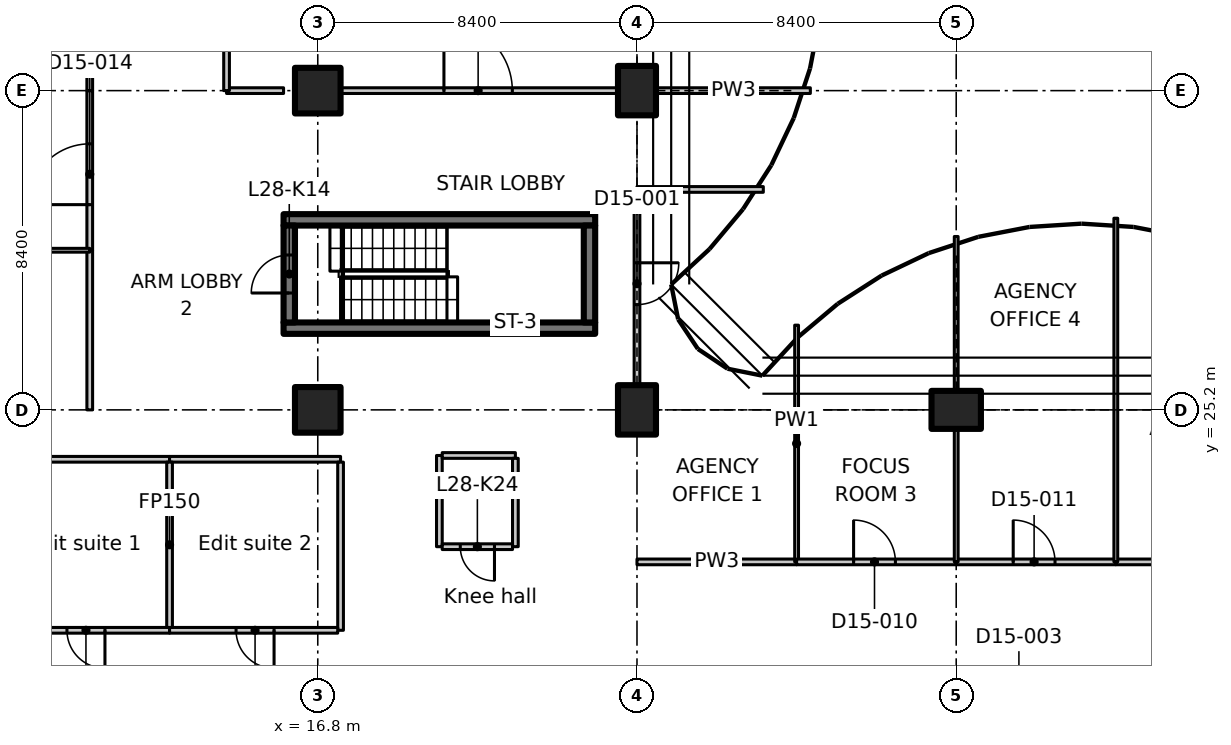
"""IFC4 building model, lengths in metres.
Left out: names, types, materials, properties, quantities, classifications, styles, units other than length and angle.
Written with IfcOpenShell. Run it as: python <this file> out.ifc"""

import sys

from ifc_helpers import new_model, si_unit, direction, frame, frame_2d, origin, origin_2d, place, context, subcontext, project, spatial, polyline, rectangle, outline, extrude, element, fill, save


model = new_model("IFC4")
c1 = context("Model", 3, precision=1e-05, world=origin(), true_north=direction((0.0, 1.0)))
c2 = subcontext(c1, "Body", "Model", "MODEL_VIEW")
j1 = project(units=[si_unit("LENGTHUNIT", "METRE"), si_unit("PLANEANGLEUNIT", "RADIAN")], contexts=[c1])
p1 = place(None, origin())
s1 = spatial("IfcSite", under=j1, at=p1, CompositionType="ELEMENT")
p2 = place(p1, origin())
s2 = spatial("IfcBuilding", under=s1, at=p2, CompositionType="ELEMENT")
p3 = place(p2, frame((0.0, 0.0, 116.9)))
s3 = spatial("IfcBuildingStorey", under=s2, at=p3, CompositionType="ELEMENT", Elevation=116.9)
for number, where, z_axis, x_axis in (
    (1, (16.8, 25.2, 0.0), (0.0, 0.0, 1.0), (1.0, 0.0, 0.0)),
    (2, (16.8, 33.6, 0.0), (0.0, 0.0, 1.0), (1.0, 0.0, 0.0)),
):
    element("IfcColumn", number, at=place(p3, frame(where, z_axis=z_axis, x_axis=x_axis)), inside=s3, PredefinedType="COLUMN", context=c2, shape_type="SweptSolid", body=[
        extrude(rectangle(XDim=1.2, YDim=1.2, at=origin_2d()), origin(), (0.0, 0.0, 1.0), 3.35),
    ])
for number, where, z_axis, x_axis in (
    (3, (25.2, 25.2, 0.0), (0.0, 0.0, 1.0), (1.0, 0.0, 0.0)),
    (4, (25.2, 33.6, 0.0), (0.0, 0.0, 1.0), (1.0, 0.0, 0.0)),
    (5, (33.6, 25.2, 0.0), (0.0, 0.0, 1.0), (0.0, 1.0, 0.0)),
):
    element("IfcColumn", number, at=place(p3, frame(where, z_axis=z_axis, x_axis=x_axis)), inside=s3, PredefinedType="COLUMN", context=c2, shape_type="SweptSolid", body=[
        extrude(rectangle(XDim=1.0, YDim=1.3, at=origin_2d()), origin(), (0.0, 0.0, 1.0), 3.35),
    ])
for number, where, z_axis, x_axis in (
    (6, (15.9, 27.35, 0.0), (0.0, 0.0, 1.0), (1.0, 0.0, 0.0)),
    (7, (15.9, 30.2, 0.0), (0.0, 0.0, 1.0), (1.0, 0.0, 0.0)),
):
    element("IfcWall", number, at=place(p3, frame(where, z_axis=z_axis, x_axis=x_axis)), inside=s3, PredefinedType="SHEAR", context=c2, shape_type="SweptSolid", body=[
        extrude(rectangle(XDim=8.2, YDim=0.3, at=frame_2d((4.1, 0.0))), origin(), (0.0, 0.0, 1.0), 3.35),
    ])
p4 = place(p3, frame((16.05, 27.5, 0.0), z_axis=(0.0, 0.0, 1.0), x_axis=(0.0, 1.0, 0.0)))
e8 = element("IfcWall", 8, at=p4, inside=s3, PredefinedType="SHEAR", context=c2, shape_type="SweptSolid", body=[
    extrude(rectangle(XDim=2.55, YDim=0.3, at=frame_2d((1.275, 0.0))), origin(), (0.0, 0.0, 1.0), 3.35),
])
p5 = place(p4, frame((0.775, 0.0, 0.0)))
e9 = element("IfcOpeningElement", 9, at=p5, cuts=e8, PredefinedType="OPENING", context=c2, shape_type="SweptSolid", body=[
    extrude(rectangle(XDim=1.0, YDim=2.1, at=frame_2d((0.5, 1.05))), frame((0.0, 0.16, 0.0), z_axis=(0.0, -1.0, 0.0), x_axis=(1.0, 0.0, 0.0)), (0.0, 0.0, 1.0), 0.32),
])
p6 = place(p3, frame((23.95, 27.5, 0.0), z_axis=(0.0, 0.0, 1.0), x_axis=(0.0, 1.0, 0.0)))
e10 = element("IfcWall", 10, at=p6, inside=s3, PredefinedType="SHEAR", context=c2, shape_type="SweptSolid", body=[
    extrude(rectangle(XDim=2.55, YDim=0.3, at=frame_2d((1.275, 0.0))), origin(), (0.0, 0.0, 1.0), 3.35),
])
p7 = place(p3, frame((12.9, 19.4, 0.0), z_axis=(0.0, 0.0, 1.0), x_axis=(-1.0, 0.0, 0.0)))
e11 = element("IfcWall", 11, at=p7, inside=s3, PredefinedType="PARTITIONING", context=c2, shape_type="SweptSolid", body=[
    extrude(rectangle(XDim=4.4, YDim=0.15, at=frame_2d((2.2, 0.0))), origin(), (0.0, 0.0, 1.0), 3.35),
])
p8 = place(p7, frame((1.7, 0.0, 0.0)))
e12 = element("IfcOpeningElement", 12, at=p8, cuts=e11, PredefinedType="OPENING", context=c2, shape_type="SweptSolid", body=[
    extrude(rectangle(XDim=1.0, YDim=2.1, at=frame_2d((0.5, 1.05))), frame((0.0, 0.085, 0.0), z_axis=(0.0, -1.0, 0.0), x_axis=(1.0, 0.0, 0.0)), (0.0, 0.0, 1.0), 0.17),
])
p9 = place(p3, frame((8.575, 23.9, 0.0), z_axis=(0.0, 0.0, 1.0), x_axis=(1.0, 0.0, 0.0)))
e13 = element("IfcWall", 13, at=p9, inside=s3, PredefinedType="PARTITIONING", context=c2, shape_type="SweptSolid", body=[
    extrude(rectangle(XDim=4.325, YDim=0.15, at=frame_2d((2.163, 0.0))), origin(), (0.0, 0.0, 1.0), 3.35),
])
p10 = place(p3, frame((12.9, 23.9, 0.0), z_axis=(0.0, 0.0, 1.0), x_axis=(1.0, 0.0, 0.0)))
e14 = element("IfcWall", 14, at=p10, inside=s3, PredefinedType="PARTITIONING", context=c2, shape_type="SweptSolid", body=[
    extrude(rectangle(XDim=4.5, YDim=0.15, at=frame_2d((2.25, 0.0))), origin(), (0.0, 0.0, 1.0), 3.35),
])
p11 = place(p3, frame((17.4, 23.825, 0.0), z_axis=(0.0, 0.0, 1.0), x_axis=(0.0, -1.0, 0.0)))
e15 = element("IfcWall", 15, at=p11, inside=s3, PredefinedType="PARTITIONING", context=c2, shape_type="SweptSolid", body=[
    extrude(rectangle(XDim=4.425, YDim=0.15, at=frame_2d((2.212, 0.0))), origin(), (0.0, 0.0, 1.0), 3.35),
])
p12 = place(p3, frame((17.325, 19.4, 0.0), z_axis=(0.0, 0.0, 1.0), x_axis=(-1.0, 0.0, 0.0)))
e16 = element("IfcWall", 16, at=p12, inside=s3, PredefinedType="PARTITIONING", context=c2, shape_type="SweptSolid", body=[
    extrude(rectangle(XDim=4.425, YDim=0.15, at=frame_2d((2.212, 0.0))), origin(), (0.0, 0.0, 1.0), 3.35),
])
p13 = place(p12, frame((1.675, 0.0, 0.0)))
e17 = element("IfcOpeningElement", 17, at=p13, cuts=e16, PredefinedType="OPENING", context=c2, shape_type="SweptSolid", body=[
    extrude(rectangle(XDim=1.0, YDim=2.1, at=frame_2d((0.5, 1.05))), frame((0.0, 0.085, 0.0), z_axis=(0.0, -1.0, 0.0), x_axis=(1.0, 0.0, 0.0)), (0.0, 0.0, 1.0), 0.17),
])
p14 = place(p3, frame((12.9, 23.825, 0.0), z_axis=(0.0, 0.0, 1.0), x_axis=(0.0, -1.0, 0.0)))
e18 = element("IfcWall", 18, at=p14, inside=s3, PredefinedType="PARTITIONING", context=c2, shape_type="SweptSolid", body=[
    extrude(rectangle(XDim=4.35, YDim=0.15, at=frame_2d((2.175, 0.0))), origin(), (0.0, 0.0, 1.0), 3.35),
])
p15 = place(p3, frame((20.0, 21.6, 0.0), z_axis=(0.0, 0.0, 1.0), x_axis=(0.0, 1.0, 0.0)))
e19 = element("IfcWall", 19, at=p15, inside=s3, PredefinedType="PARTITIONING", context=c2, shape_type="SweptSolid", body=[
    extrude(rectangle(XDim=2.4, YDim=0.15, at=frame_2d((1.2, 0.0))), origin(), (0.0, 0.0, 1.0), 3.35),
])
p16 = place(p3, frame((20.075, 24.0, 0.0), z_axis=(0.0, 0.0, 1.0), x_axis=(1.0, 0.0, 0.0)))
e20 = element("IfcWall", 20, at=p16, inside=s3, PredefinedType="PARTITIONING", context=c2, shape_type="SweptSolid", body=[
    extrude(rectangle(XDim=1.925, YDim=0.15, at=frame_2d((0.962, 0.0))), origin(), (0.0, 0.0, 1.0), 3.35),
])
p17 = place(p3, frame((22.0, 23.925, 0.0), z_axis=(0.0, 0.0, 1.0), x_axis=(0.0, -1.0, 0.0)))
e21 = element("IfcWall", 21, at=p17, inside=s3, PredefinedType="PARTITIONING", context=c2, shape_type="SweptSolid", body=[
    extrude(rectangle(XDim=2.325, YDim=0.15, at=frame_2d((1.163, 0.0))), origin(), (0.0, 0.0, 1.0), 3.35),
])
p18 = place(p3, frame((21.925, 21.6, 0.0), z_axis=(0.0, 0.0, 1.0), x_axis=(-1.0, 0.0, 0.0)))
e22 = element("IfcWall", 22, at=p18, inside=s3, PredefinedType="PARTITIONING", context=c2, shape_type="SweptSolid", body=[
    extrude(rectangle(XDim=1.85, YDim=0.15, at=frame_2d((0.925, 0.0))), origin(), (0.0, 0.0, 1.0), 3.35),
])
p19 = place(p18, frame((0.475, 0.0, 0.0)))
e23 = element("IfcOpeningElement", 23, at=p19, cuts=e22, PredefinedType="OPENING", context=c2, shape_type="SweptSolid", body=[
    extrude(rectangle(XDim=0.9, YDim=2.1, at=frame_2d((0.45, 1.05))), frame((0.0, 0.085, 0.0), z_axis=(0.0, -1.0, 0.0), x_axis=(1.0, 0.0, 0.0)), (0.0, 0.0, 1.0), 0.17),
])
p20 = place(p3, frame((25.2, 21.2, 0.0), z_axis=(0.0, 0.0, 1.0), x_axis=(1.0, 0.0, 0.0)))
e24 = element("IfcWall", 24, at=p20, inside=s3, PredefinedType="PARTITIONING", context=c2, shape_type="SweptSolid", body=[
    extrude(rectangle(XDim=4.2, YDim=0.15, at=frame_2d((2.1, 0.0))), origin(), (0.0, 0.0, 1.0), 3.33),
])
p21 = place(p3, frame((29.4, 27.429, 0.0), z_axis=(0.0, 0.0, 1.0), x_axis=(0.0, -1.0, 0.0)))
e25 = element("IfcWall", 25, at=p21, inside=s3, PredefinedType="PARTITIONING", context=c2, shape_type="SweptSolid", body=[
    extrude(outline(polyline([(0.0, 0.0), (6.229, 0.0), (6.229, 3.33), (2.679, 3.33), (2.677, 2.98), (1.781, 2.98), (1.779, 3.33), (0.154, 3.33), (0.0, 3.33), (0.0, 0.0)])), frame((0.0, 0.05, 0.0), z_axis=(0.0, -1.0, 0.0), x_axis=(1.0, 0.0, 0.0)), (0.0, 0.0, 1.0), 0.1),
])
p22 = place(p3, frame((25.2, 31.0, 0.0), z_axis=(0.0, 0.0, 1.0), x_axis=(0.0, -1.0, 0.0)))
e26 = element("IfcWall", 26, at=p22, inside=s3, PredefinedType="PARTITIONING", context=c2, shape_type="SweptSolid", body=[
    extrude(outline(polyline([(0.0, 0.0), (5.13, 0.0), (5.13, 2.98), (0.0, 2.98), (0.0, 0.0)])), frame((0.0, 0.075, 0.0), z_axis=(0.0, -1.0, 0.0), x_axis=(1.0, 0.0, 0.0)), (0.0, 0.0, 1.0), 0.15),
])
p23 = place(p22, frame((1.93, 0.0, 0.0)))
e27 = element("IfcOpeningElement", 27, at=p23, cuts=e26, PredefinedType="OPENING", context=c2, shape_type="SweptSolid", body=[
    extrude(rectangle(XDim=1.1, YDim=2.1, at=frame_2d((0.55, 1.05))), frame((0.0, 0.085, 0.0), z_axis=(0.0, -1.0, 0.0), x_axis=(1.0, 0.0, 0.0)), (0.0, 0.0, 1.0), 0.17),
])
p24 = place(p3, frame((25.2, 31.0, 0.0), z_axis=(0.0, 0.0, 1.0), x_axis=(1.0, 0.0, 0.0)))
e28 = element("IfcWall", 28, at=p24, inside=s3, PredefinedType="PARTITIONING", context=c2, shape_type="SweptSolid", body=[
    extrude(rectangle(XDim=3.324, YDim=0.15, at=frame_2d((1.662, 0.0))), origin(), (0.0, 0.0, 1.0), 2.98),
])
p25 = place(p3, frame((29.4, 21.2, 0.0), z_axis=(0.0, 0.0, 1.0), x_axis=(1.0, 0.0, 0.0)))
e29 = element("IfcWall", 29, at=p25, inside=s3, PredefinedType="PARTITIONING", context=c2, shape_type="SweptSolid", body=[
    extrude(rectangle(XDim=4.2, YDim=0.15, at=frame_2d((2.1, 0.0))), origin(), (0.0, 0.0, 1.0), 3.33),
])
p26 = place(p25, frame((1.5, 0.0, 0.0)))
e30 = element("IfcOpeningElement", 30, at=p26, cuts=e29, PredefinedType="OPENING", context=c2, shape_type="SweptSolid", body=[
    extrude(rectangle(XDim=1.1, YDim=2.1, at=frame_2d((0.55, 1.05))), frame((0.0, 0.085, 0.0), z_axis=(0.0, -1.0, 0.0), x_axis=(1.0, 0.0, 0.0)), (0.0, 0.0, 1.0), 0.17),
])
p27 = place(p3, frame((33.6, 21.2, 0.0), z_axis=(0.0, 0.0, 1.0), x_axis=(1.0, 0.0, 0.0)))
e31 = element("IfcWall", 31, at=p27, inside=s3, PredefinedType="PARTITIONING", context=c2, shape_type="SweptSolid", body=[
    extrude(rectangle(XDim=4.2, YDim=0.15, at=frame_2d((2.1, 0.0))), origin(), (0.0, 0.0, 1.0), 3.33),
])
p28 = place(p27, frame((1.5, 0.0, 0.0)))
e32 = element("IfcOpeningElement", 32, at=p28, cuts=e31, PredefinedType="OPENING", context=c2, shape_type="SweptSolid", body=[
    extrude(rectangle(XDim=1.1, YDim=2.1, at=frame_2d((0.55, 1.05))), frame((0.0, 0.085, 0.0), z_axis=(0.0, -1.0, 0.0), x_axis=(1.0, 0.0, 0.0)), (0.0, 0.0, 1.0), 0.17),
])
p29 = place(p3, frame((37.8, 21.2, 0.0), z_axis=(0.0, 0.0, 1.0), x_axis=(1.0, 0.0, 0.0)))
e33 = element("IfcWall", 33, at=p29, inside=s3, PredefinedType="PARTITIONING", context=c2, shape_type="SweptSolid", body=[
    extrude(rectangle(XDim=13.2, YDim=0.15, at=frame_2d((6.6, 0.0))), origin(), (0.0, 0.0, 1.0), 3.33),
])
p30 = place(p29, frame((5.7, 0.0, 0.0)))
e34 = element("IfcOpeningElement", 34, at=p30, cuts=e33, PredefinedType="OPENING", context=c2, shape_type="SweptSolid", body=[
    extrude(rectangle(XDim=2.0, YDim=2.4, at=frame_2d((1.0, 1.2))), frame((0.0, 0.085, 0.0), z_axis=(0.0, -1.0, 0.0), x_axis=(1.0, 0.0, 0.0)), (0.0, 0.0, 1.0), 0.17),
])
p31 = place(p3, frame((33.6, 29.762, 0.0), z_axis=(0.0, 0.0, 1.0), x_axis=(0.0, -1.0, 0.0)))
e35 = element("IfcWall", 35, at=p31, inside=s3, PredefinedType="PARTITIONING", context=c2, shape_type="SweptSolid", body=[
    extrude(rectangle(XDim=4.042, YDim=0.1, at=frame_2d((2.021, 0.0))), origin(), (0.0, 0.0, 1.0), 2.98),
])
p32 = place(p3, frame((33.6, 24.68, 0.0), z_axis=(0.0, 0.0, 1.0), x_axis=(0.0, -1.0, 0.0)))
e36 = element("IfcWall", 36, at=p32, inside=s3, PredefinedType="PARTITIONING", context=c2, shape_type="SweptSolid", body=[
    extrude(rectangle(XDim=3.48, YDim=0.1, at=frame_2d((1.74, 0.0))), origin(), (0.0, 0.0, 1.0), 3.33),
])
p33 = place(p3, frame((37.8, 30.243, 0.0), z_axis=(0.0, 0.0, 1.0), x_axis=(0.0, -1.0, 0.0)))
e37 = element("IfcWall", 37, at=p33, inside=s3, PredefinedType="PARTITIONING", context=c2, shape_type="SweptSolid", body=[
    extrude(outline(polyline([(0.0, 0.0), (9.043, 0.0), (9.043, 3.33), (5.493, 3.33), (5.491, 2.98), (4.595, 2.98), (4.593, 3.33), (0.0, 3.33), (0.0, 0.0)])), frame((0.0, 0.05, 0.0), z_axis=(0.0, -1.0, 0.0), x_axis=(1.0, 0.0, 0.0)), (0.0, 0.0, 1.0), 0.1),
])
p34 = place(p3, frame((10.8, 29.4, 0.0), z_axis=(0.0, 0.0, 1.0), x_axis=(0.0, 1.0, 0.0)))
e38 = element("IfcWall", 38, at=p34, inside=s3, PredefinedType="PARTITIONING", context=c2, shape_type="SweptSolid", body=[
    extrude(rectangle(XDim=4.2, YDim=0.15, at=frame_2d((2.1, 0.0))), origin(), (0.0, 0.0, 1.0), 3.33),
])
p35 = place(p34, frame((1.2, 0.0, 0.0)))
e39 = element("IfcOpeningElement", 39, at=p35, cuts=e38, PredefinedType="OPENING", context=c2, shape_type="SweptSolid", body=[
    extrude(rectangle(XDim=1.6, YDim=2.1, at=frame_2d((0.8, 1.05))), frame((0.0, 0.085, 0.0), z_axis=(0.0, -1.0, 0.0), x_axis=(1.0, 0.0, 0.0)), (0.0, 0.0, 1.0), 0.17),
])
p36 = place(p3, frame((10.8, 25.2, 0.0), z_axis=(0.0, 0.0, 1.0), x_axis=(0.0, 1.0, 0.0)))
e40 = element("IfcWall", 40, at=p36, inside=s3, PredefinedType="PARTITIONING", context=c2, shape_type="SweptSolid", body=[
    extrude(rectangle(XDim=4.2, YDim=0.15, at=frame_2d((2.1, 0.0))), origin(), (0.0, 0.0, 1.0), 3.33),
])
p37 = place(p3, frame((14.4, 33.6, 0.0), z_axis=(0.0, 0.0, 1.0), x_axis=(1.0, 0.0, 0.0)))
e41 = element("IfcWall", 41, at=p37, inside=s3, PredefinedType="PARTITIONING", context=c2, shape_type="SweptSolid", body=[
    extrude(rectangle(XDim=1.5, YDim=0.15, at=frame_2d((0.75, 0.0))), origin(), (0.0, 0.0, 1.0), 3.33),
])
p38 = place(p3, frame((17.42, 33.6, 0.0), z_axis=(0.0, 0.0, 1.0), x_axis=(1.0, 0.0, 0.0)))
e42 = element("IfcWall", 42, at=p38, inside=s3, PredefinedType="PARTITIONING", context=c2, shape_type="SweptSolid", body=[
    extrude(rectangle(XDim=7.26, YDim=0.15, at=frame_2d((3.63, 0.0))), origin(), (0.0, 0.0, 1.0), 3.33),
])
p39 = place(p38, frame((2.7, 0.0, 0.0)))
e43 = element("IfcOpeningElement", 43, at=p39, cuts=e42, PredefinedType="OPENING", context=c2, shape_type="SweptSolid", body=[
    extrude(rectangle(XDim=1.8, YDim=2.1, at=frame_2d((0.9, 1.05))), frame((0.0, 0.085, 0.0), z_axis=(0.0, -1.0, 0.0), x_axis=(1.0, 0.0, 0.0)), (0.0, 0.0, 1.0), 0.17),
])
p40 = place(p3, frame((25.72, 33.6, 0.0), z_axis=(0.0, 0.0, 1.0), x_axis=(1.0, 0.0, 0.0)))
e44 = element("IfcWall", 44, at=p40, inside=s3, PredefinedType="PARTITIONING", context=c2, shape_type="SweptSolid", body=[
    extrude(rectangle(XDim=4.042, YDim=0.15, at=frame_2d((2.021, 0.0))), origin(), (0.0, 0.0, 1.0), 2.98),
])
p41 = place(p3, frame((10.8, 33.6, 0.0), z_axis=(0.0, 0.0, 1.0), x_axis=(0.0, 1.0, 0.0)))
e45 = element("IfcWall", 45, at=p41, inside=s3, PredefinedType="PARTITIONING", context=c2, shape_type="SweptSolid", body=[
    extrude(rectangle(XDim=4.2, YDim=0.15, at=frame_2d((2.1, 0.0))), origin(), (0.0, 0.0, 1.0), 3.33),
])
p42 = place(p3, frame((14.4, 42.0, 0.0), z_axis=(0.0, 0.0, 1.0), x_axis=(0.0, -1.0, 0.0)))
e46 = element("IfcWall", 46, at=p42, inside=s3, PredefinedType="PARTITIONING", context=c2, shape_type="SweptSolid", body=[
    extrude(rectangle(XDim=8.4, YDim=0.15, at=frame_2d((4.2, 0.0))), origin(), (0.0, 0.0, 1.0), 3.33),
])
p43 = place(p3, frame((10.8, 29.4, 0.0), z_axis=(0.0, 0.0, 1.0), x_axis=(-1.0, 0.0, 0.0)))
e47 = element("IfcWall", 47, at=p43, inside=s3, PredefinedType="PARTITIONING", context=c2, shape_type="SweptSolid", body=[
    extrude(rectangle(XDim=7.2, YDim=0.1, at=frame_2d((3.6, 0.0))), origin(), (0.0, 0.0, 1.0), 3.33),
])
p44 = place(p43, frame((3.0, 0.0, 0.0)))
e48 = element("IfcOpeningElement", 48, at=p44, cuts=e47, PredefinedType="OPENING", context=c2, shape_type="SweptSolid", body=[
    extrude(rectangle(XDim=1.0, YDim=2.1, at=frame_2d((0.5, 1.05))), frame((0.0, 0.06, 0.0), z_axis=(0.0, -1.0, 0.0), x_axis=(1.0, 0.0, 0.0)), (0.0, 0.0, 1.0), 0.12),
])
p45 = place(p5, origin())
e49 = element("IfcDoor", 49, at=p45, inside=s3, OperationType="SINGLE_SWING_RIGHT", PredefinedType="DOOR", context=c2, shape_type="SweptSolid", body=[
    extrude(rectangle(XDim=1.0, YDim=2.1, at=frame_2d((0.5, 1.05))), frame((0.0, 0.025, 0.0), z_axis=(0.0, -1.0, 0.0), x_axis=(1.0, 0.0, 0.0)), (0.0, 0.0, 1.0), 0.05),
])
fill(e9, e49)
p46 = place(p19, origin())
e50 = element("IfcDoor", 50, at=p46, inside=s3, OperationType="SINGLE_SWING_RIGHT", PredefinedType="DOOR", context=c2, shape_type="SweptSolid", body=[
    extrude(rectangle(XDim=0.9, YDim=2.1, at=frame_2d((0.45, 1.05))), frame((0.0, 0.025, 0.0), z_axis=(0.0, -1.0, 0.0), x_axis=(1.0, 0.0, 0.0)), (0.0, 0.0, 1.0), 0.05),
])
fill(e23, e50)
p47 = place(p8, origin())
e51 = element("IfcDoor", 51, at=p47, inside=s3, OperationType="SINGLE_SWING_LEFT", PredefinedType="DOOR", context=c2, shape_type="SweptSolid", body=[
    extrude(rectangle(XDim=1.0, YDim=2.1, at=frame_2d((0.5, 1.05))), frame((0.0, 0.025, 0.0), z_axis=(0.0, -1.0, 0.0), x_axis=(1.0, 0.0, 0.0)), (0.0, 0.0, 1.0), 0.05),
])
fill(e12, e51)
p48 = place(p13, origin())
e52 = element("IfcDoor", 52, at=p48, inside=s3, OperationType="SINGLE_SWING_RIGHT", PredefinedType="DOOR", context=c2, shape_type="SweptSolid", body=[
    extrude(rectangle(XDim=1.0, YDim=2.1, at=frame_2d((0.5, 1.05))), frame((0.0, 0.025, 0.0), z_axis=(0.0, -1.0, 0.0), x_axis=(1.0, 0.0, 0.0)), (0.0, 0.0, 1.0), 0.05),
])
fill(e17, e52)
p49 = place(p23, origin())
e53 = element("IfcDoor", 53, at=p49, inside=s3, OperationType="SINGLE_SWING_RIGHT", PredefinedType="DOOR", context=c2, shape_type="SweptSolid", body=[
    extrude(rectangle(XDim=1.1, YDim=2.1, at=frame_2d((0.55, 1.05))), frame((0.0, 0.025, 0.0), z_axis=(0.0, -1.0, 0.0), x_axis=(1.0, 0.0, 0.0)), (0.0, 0.0, 1.0), 0.05),
])
fill(e27, e53)
p50 = place(p26, origin())
e54 = element("IfcDoor", 54, at=p50, inside=s3, OperationType="SINGLE_SWING_LEFT", PredefinedType="DOOR", context=c2, shape_type="SweptSolid", body=[
    extrude(rectangle(XDim=1.1, YDim=2.1, at=frame_2d((0.55, 1.05))), frame((0.0, 0.025, 0.0), z_axis=(0.0, -1.0, 0.0), x_axis=(1.0, 0.0, 0.0)), (0.0, 0.0, 1.0), 0.05),
])
fill(e30, e54)
p51 = place(p28, origin())
e55 = element("IfcDoor", 55, at=p51, inside=s3, OperationType="SINGLE_SWING_LEFT", PredefinedType="DOOR", context=c2, shape_type="SweptSolid", body=[
    extrude(rectangle(XDim=1.1, YDim=2.1, at=frame_2d((0.55, 1.05))), frame((0.0, 0.025, 0.0), z_axis=(0.0, -1.0, 0.0), x_axis=(1.0, 0.0, 0.0)), (0.0, 0.0, 1.0), 0.05),
])
fill(e32, e55)
p52 = place(p35, origin())
e56 = element("IfcDoor", 56, at=p52, inside=s3, OperationType="DOUBLE_DOOR_SINGLE_SWING", PredefinedType="DOOR", context=c2, shape_type="SweptSolid", body=[
    extrude(rectangle(XDim=1.6, YDim=2.1, at=frame_2d((0.8, 1.05))), frame((0.0, 0.025, 0.0), z_axis=(0.0, -1.0, 0.0), x_axis=(1.0, 0.0, 0.0)), (0.0, 0.0, 1.0), 0.05),
])
fill(e39, e56)
p53 = place(p39, origin())
e57 = element("IfcDoor", 57, at=p53, inside=s3, OperationType="DOUBLE_DOOR_SINGLE_SWING", PredefinedType="DOOR", context=c2, shape_type="SweptSolid", body=[
    extrude(rectangle(XDim=1.8, YDim=2.1, at=frame_2d((0.9, 1.05))), frame((0.0, 0.025, 0.0), z_axis=(0.0, -1.0, 0.0), x_axis=(1.0, 0.0, 0.0)), (0.0, 0.0, 1.0), 0.05),
])
fill(e43, e57)
save(model, sys.argv[1])
